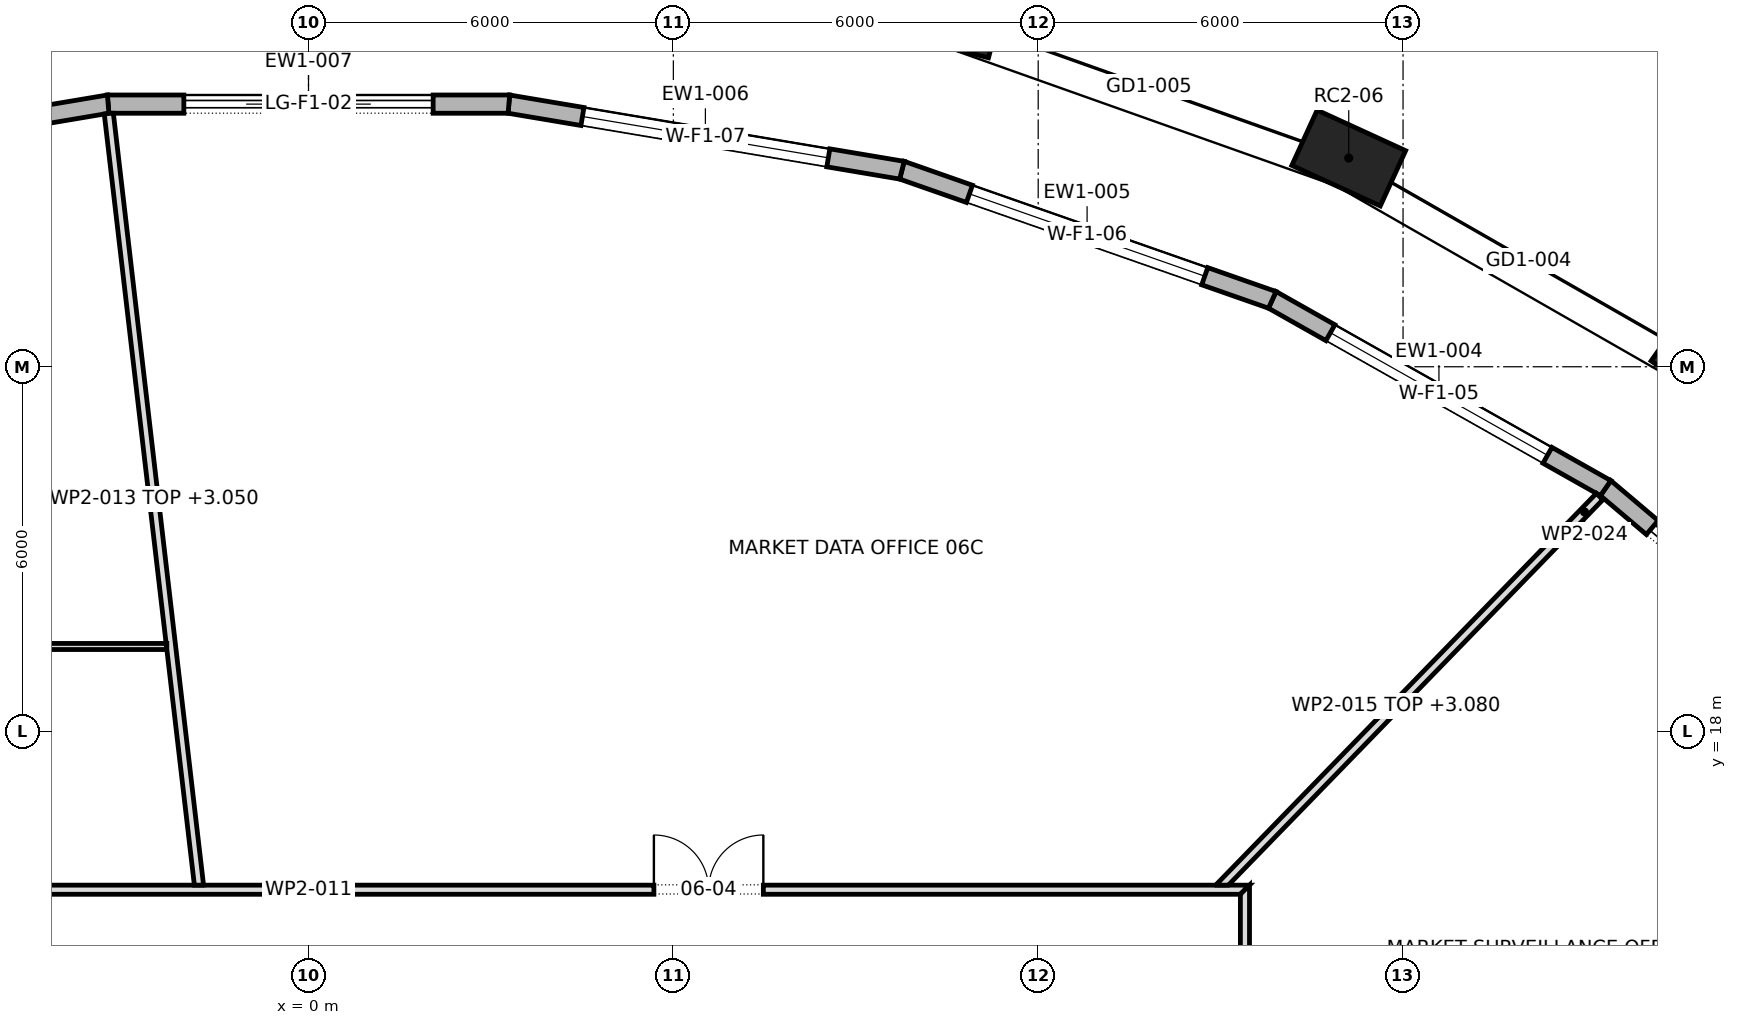
"""IFC4 building model, lengths in metres.
Left out: names, types, materials, properties, quantities, classifications, styles, units other than length and angle.
Written with IfcOpenShell. Run it as: python <this file> out.ifc"""

import sys

from ifc_helpers import new_model, si_unit, direction, frame, frame_2d, origin, origin_2d, place, context, subcontext, project, spatial, polyline, rectangle, outline, extrude, element, fill, save


model = new_model("IFC4")
c1 = context("Model", 3, precision=1e-05, world=origin(), true_north=direction((0.0, 1.0)))
c2 = subcontext(c1, "Body", "Model", "MODEL_VIEW")
j1 = project(units=[si_unit("LENGTHUNIT", "METRE"), si_unit("PLANEANGLEUNIT", "RADIAN")], contexts=[c1])
p1 = place(None, origin())
s1 = spatial("IfcSite", under=j1, at=p1, CompositionType="ELEMENT")
p2 = place(p1, origin())
s2 = spatial("IfcBuilding", under=s1, at=p2, CompositionType="ELEMENT")
p3 = place(p2, frame((0.0, 0.0, 86.5)))
s3 = spatial("IfcBuildingStorey", under=s2, at=p3, CompositionType="ELEMENT", Elevation=86.5)
for number, where, z_axis, x_axis in (
    (1, (23.022, 24.045, 0.0), (0.0, 0.0, 1.0), (-0.818, 0.575, 0.0)),
    (2, (17.107, 27.432, 0.0), (0.0, 0.0, 1.0), (-0.909, 0.417, 0.0)),
    (3, (10.534, 29.766, 0.0), (0.0, 0.0, 1.0), (-0.968, 0.252, 0.0)),
):
    element("IfcColumn", number, at=place(p3, frame(where, z_axis=z_axis, x_axis=x_axis)), inside=s3, PredefinedType="COLUMN", context=c2, shape_type="SweptSolid", body=[
        extrude(rectangle(XDim=1.6, YDim=1.0, at=origin_2d()), origin(), (0.0, 0.0, 1.0), 4.2),
    ])
p4 = place(p3, frame((25.996, 18.062, 0.0), z_axis=(0.0, 0.0, 1.0), x_axis=(-0.763753100684, 0.645508482667, 0.0)))
e4 = element("IfcWall", 4, at=p4, inside=s3, PredefinedType="STANDARD", context=c2, shape_type="SweptSolid", body=[
    extrude(outline(polyline([(-0.015, -0.15), (6.122, -0.15), (6.093, 0.15), (0.015, 0.15), (-0.015, -0.15)])), origin(), (0.0, 0.0, 1.0), 3.9),
])
p5 = place(p4, frame((1.004, 0.0, 0.0)))
e5 = element("IfcOpeningElement", 5, at=p5, cuts=e4, PredefinedType="OPENING", context=c2, shape_type="SweptSolid", body=[
    extrude(rectangle(XDim=4.1, YDim=3.45, at=frame_2d((2.05, 1.725))), frame((0.0, 0.162, 0.0), z_axis=(0.0, -1.0, 0.0), x_axis=(1.0, 0.0, 0.0)), (0.0, 0.0, 1.0), 0.324),
])
p6 = place(p3, frame((21.332, 22.004, 0.0), z_axis=(0.0, 0.0, 1.0), x_axis=(-0.870737550302, 0.491748023376, 0.0)))
e6 = element("IfcWall", 6, at=p6, inside=s3, PredefinedType="STANDARD", context=c2, shape_type="SweptSolid", body=[
    extrude(outline(polyline([(-0.014, -0.15), (6.31, -0.15), (6.283, 0.15), (0.014, 0.15), (-0.014, -0.15)])), origin(), (0.0, 0.0, 1.0), 3.9),
])
p7 = place(p6, frame((1.098, 0.0, 0.6)))
e7 = element("IfcOpeningElement", 7, at=p7, cuts=e6, PredefinedType="OPENING", context=c2, shape_type="SweptSolid", body=[
    extrude(rectangle(XDim=4.1, YDim=2.85, at=frame_2d((2.05, 1.425))), frame((0.0, 0.162, 0.0), z_axis=(0.0, -1.0, 0.0), x_axis=(1.0, 0.0, 0.0)), (0.0, 0.0, 1.0), 0.324),
])
p8 = place(p3, frame((15.849, 25.1, 0.0), z_axis=(0.0, 0.0, 1.0), x_axis=(-0.943820008365, 0.330459970057, 0.0)))
e8 = element("IfcWall", 8, at=p8, inside=s3, PredefinedType="STANDARD", context=c2, shape_type="SweptSolid", body=[
    extrude(outline(polyline([(-0.013, -0.15), (6.465, -0.15), (6.44, 0.15), (0.013, 0.15), (-0.013, -0.15)])), origin(), (0.0, 0.0, 1.0), 3.9),
])
p9 = place(p8, frame((1.176, 0.0, 0.6)))
e9 = element("IfcOpeningElement", 9, at=p9, cuts=e8, PredefinedType="OPENING", context=c2, shape_type="SweptSolid", body=[
    extrude(rectangle(XDim=4.1, YDim=2.85, at=frame_2d((2.05, 1.425))), frame((0.0, 0.162, 0.0), z_axis=(0.0, -1.0, 0.0), x_axis=(1.0, 0.0, 0.0)), (0.0, 0.0, 1.0), 0.324),
])
p10 = place(p3, frame((9.759, 27.232, 0.0), z_axis=(0.0, 0.0, 1.0), x_axis=(-0.986162431544, 0.165781961053, 0.0)))
e10 = element("IfcWall", 10, at=p10, inside=s3, PredefinedType="STANDARD", context=c2, shape_type="SweptSolid", body=[
    extrude(outline(polyline([(-0.013, -0.15), (6.567, -0.15), (6.542, 0.15), (0.013, 0.15), (-0.013, -0.15)])), origin(), (0.0, 0.0, 1.0), 3.9),
])
p11 = place(p10, frame((1.227, 0.0, 0.6)))
e11 = element("IfcOpeningElement", 11, at=p11, cuts=e10, PredefinedType="OPENING", context=c2, shape_type="SweptSolid", body=[
    extrude(rectangle(XDim=4.1, YDim=2.85, at=frame_2d((2.05, 1.425))), frame((0.0, 0.162, 0.0), z_axis=(0.0, -1.0, 0.0), x_axis=(1.0, 0.0, 0.0)), (0.0, 0.0, 1.0), 0.324),
])
p12 = place(p3, frame((3.295, 28.319, 0.0), z_axis=(0.0, 0.0, 1.0), x_axis=(-1.0, 0.0, 0.0)))
e12 = element("IfcWall", 12, at=p12, inside=s3, PredefinedType="STANDARD", context=c2, shape_type="SweptSolid", body=[
    extrude(outline(polyline([(-0.012, -0.15), (6.602, -0.15), (6.577, 0.15), (0.012, 0.15), (-0.012, -0.15)])), origin(), (0.0, 0.0, 1.0), 3.9),
])
p13 = place(p12, frame((1.245, 0.0, 0.0)))
e13 = element("IfcOpeningElement", 13, at=p13, cuts=e12, PredefinedType="OPENING", context=c2, shape_type="SweptSolid", body=[
    extrude(rectangle(XDim=4.1, YDim=3.45, at=frame_2d((2.05, 1.725))), frame((0.0, 0.162, 0.0), z_axis=(0.0, -1.0, 0.0), x_axis=(1.0, 0.0, 0.0)), (0.0, 0.0, 1.0), 0.324),
])
p14 = place(p3, frame((-3.295, 28.319, 0.0), z_axis=(0.0, 0.0, 1.0), x_axis=(-0.986162431544, -0.165781961053, 0.0)))
e14 = element("IfcWall", 14, at=p14, inside=s3, PredefinedType="STANDARD", context=c2, shape_type="SweptSolid", body=[
    extrude(outline(polyline([(-0.012, -0.15), (6.568, -0.15), (6.542, 0.15), (0.012, 0.15), (-0.012, -0.15)])), origin(), (0.0, 0.0, 1.0), 3.9),
])
p15 = place(p14, frame((1.227, 0.0, 0.6)))
e15 = element("IfcOpeningElement", 15, at=p15, cuts=e14, PredefinedType="OPENING", context=c2, shape_type="SweptSolid", body=[
    extrude(rectangle(XDim=4.1, YDim=2.85, at=frame_2d((2.05, 1.425))), frame((0.0, 0.162, 0.0), z_axis=(0.0, -1.0, 0.0), x_axis=(1.0, 0.0, 0.0)), (0.0, 0.0, 1.0), 0.324),
])
p16 = place(p3, frame((-15.475, 15.4, 0.0), z_axis=(0.0, 0.0, 1.0), x_axis=(1.0, 0.0, 0.0)))
e16 = element("IfcWall", 16, at=p16, inside=s3, PredefinedType="PARTITIONING", context=c2, shape_type="SweptSolid", body=[
    extrude(outline(polyline([(0.15, -0.075), (2.066, -0.075), (3.981, -0.075), (5.897, -0.075), (7.812, -0.075), (9.728, -0.075), (11.644, -0.075), (13.56, -0.075), (15.475, -0.075), (17.391, -0.075), (19.306, -0.075), (21.222, -0.075), (23.138, -0.075), (25.053, -0.075), (26.969, -0.075), (28.885, -0.075), (30.8, -0.075), (30.95, 0.075), (29.016, 0.075), (27.081, 0.075), (25.147, 0.075), (23.212, 0.075), (21.278, 0.075), (19.344, 0.075), (17.409, 0.075), (15.475, 0.075), (13.541, 0.075), (11.606, 0.075), (9.672, 0.075), (7.738, 0.075), (5.803, 0.075), (3.869, 0.075), (1.935, 0.075), (0.0, 0.075), (0.15, -0.075)])), origin(), (0.0, 0.0, 1.0), 3.9),
])
p17 = place(p16, frame((21.155, 0.0, 0.0)))
e17 = element("IfcOpeningElement", 17, at=p17, cuts=e16, PredefinedType="OPENING", context=c2, shape_type="SweptSolid", body=[
    extrude(rectangle(XDim=1.8, YDim=2.1, at=frame_2d((0.9, 1.05))), frame((0.0, 0.087, 0.0), z_axis=(0.0, -1.0, 0.0), x_axis=(1.0, 0.0, 0.0)), (0.0, 0.0, 1.0), 0.174),
])
p18 = place(p16, frame((9.21, 0.0, 0.0)))
e18 = element("IfcOpeningElement", 18, at=p18, cuts=e16, PredefinedType="OPENING", context=c2, shape_type="SweptSolid", body=[
    extrude(rectangle(XDim=1.0, YDim=2.1, at=frame_2d((0.5, 1.05))), frame((0.0, 0.087, 0.0), z_axis=(0.0, -1.0, 0.0), x_axis=(1.0, 0.0, 0.0)), (0.0, 0.0, 1.0), 0.174),
])
p19 = place(p16, frame((2.405, 0.0, 0.0)))
e19 = element("IfcOpeningElement", 19, at=p19, cuts=e16, PredefinedType="OPENING", context=c2, shape_type="SweptSolid", body=[
    extrude(rectangle(XDim=1.0, YDim=2.1, at=frame_2d((0.5, 1.05))), frame((0.0, 0.087, 0.0), z_axis=(0.0, -1.0, 0.0), x_axis=(1.0, 0.0, 0.0)), (0.0, 0.0, 1.0), 0.174),
])
p20 = place(p3, frame((-12.212, 19.4, 0.0), z_axis=(0.0, 0.0, 1.0), x_axis=(1.0, 0.0, 0.0)))
e20 = element("IfcWall", 20, at=p20, inside=s3, PredefinedType="PARTITIONING", context=c2, shape_type="SweptSolid", body=[
    extrude(outline(polyline([(9.882, -0.05), (9.882, -0.047), (9.871, 0.05), (7.896, 0.05), (5.922, 0.05), (3.948, 0.05), (1.974, 0.05), (0.0, 0.05), (0.0, 0.049), (0.063, -0.05), (2.027, -0.05), (3.99, -0.05), (5.954, -0.05), (7.918, -0.05), (9.882, -0.05)])), origin(), (0.0, 0.0, 1.0), 3.9),
])
p21 = place(p20, frame((4.497, 0.0, 0.0)))
e21 = element("IfcOpeningElement", 21, at=p21, cuts=e20, PredefinedType="OPENING", context=c2, shape_type="SweptSolid", body=[
    extrude(rectangle(XDim=0.9, YDim=2.1, at=frame_2d((0.45, 1.05))), frame((0.0, 0.062, 0.0), z_axis=(0.0, -1.0, 0.0), x_axis=(1.0, 0.0, 0.0)), (0.0, 0.0, 1.0), 0.124),
])
p22 = place(p3, frame((-3.284, 28.165, 0.0), z_axis=(0.0, 0.0, 1.0), x_axis=(0.116072244208, -0.993240773491, 0.0)))
e22 = element("IfcWall", 22, at=p22, inside=s3, PredefinedType="PARTITIONING", context=c2, shape_type="SweptSolid", body=[
    extrude(outline(polyline([(0.0, -0.075), (1.753, -0.075), (3.506, -0.075), (5.259, -0.075), (7.012, -0.075), (8.765, -0.075), (8.766, -0.064), (8.862, -0.075), (10.814, -0.075), (12.767, -0.075), (12.784, 0.071), (12.784, 0.075), (10.958, 0.075), (9.133, 0.075), (7.307, 0.075), (5.481, 0.075), (3.656, 0.075), (1.83, 0.075), (0.004, 0.075), (0.0, 0.038), (0.0, -0.075)])), origin(), (0.0, 0.0, 1.0), 3.05),
])
p23 = place(p3, frame((14.972, 15.423, 0.0), z_axis=(0.0, 0.0, 1.0), x_axis=(0.696854208529, 0.717212808067, 0.0)))
e23 = element("IfcWall", 23, at=p23, inside=s3, PredefinedType="PARTITIONING", context=c2, shape_type="SweptSolid", body=[
    extrude(outline(polyline([(0.0, 0.075), (0.0, 0.074), (0.145, -0.075), (1.771, -0.075), (3.397, -0.075), (5.023, -0.075), (6.649, -0.075), (8.274, -0.075), (8.274, 0.075), (6.62, 0.075), (4.965, 0.075), (3.31, 0.075), (1.655, 0.075), (0.0, 0.075)])), origin(), (0.0, 0.0, 1.0), 3.08),
])
p24 = place(p3, frame((15.4, -4.54, 0.0), z_axis=(0.0, 0.0, 1.0), x_axis=(0.0, 1.0, 0.0)))
e24 = element("IfcWall", 24, at=p24, inside=s3, PredefinedType="PARTITIONING", context=c2, shape_type="SweptSolid", body=[
    extrude(outline(polyline([(0.0, -0.075), (1.82, -0.075), (3.639, -0.075), (5.458, -0.075), (7.278, -0.075), (9.098, -0.075), (10.917, -0.075), (12.737, -0.075), (14.556, -0.075), (16.376, -0.075), (18.195, -0.075), (20.015, -0.075), (19.865, 0.075), (17.878, 0.075), (15.892, 0.075), (13.906, 0.075), (11.919, 0.075), (9.933, 0.075), (7.946, 0.075), (5.959, 0.075), (3.973, 0.075), (1.987, 0.075), (0.0, 0.075), (0.0, -0.075)])), origin(), (0.0, 0.0, 1.0), 3.9),
])
p25 = place(p24, frame((5.25, 0.0, 0.0)))
e25 = element("IfcOpeningElement", 25, at=p25, cuts=e24, PredefinedType="OPENING", context=c2, shape_type="SweptSolid", body=[
    extrude(rectangle(XDim=1.0, YDim=2.1, at=frame_2d((0.5, 1.05))), frame((0.0, 0.087, 0.0), z_axis=(0.0, -1.0, 0.0), x_axis=(1.0, 0.0, 0.0)), (0.0, 0.0, 1.0), 0.174),
])
p26 = place(p24, frame((15.22, 0.0, 0.0)))
e26 = element("IfcOpeningElement", 26, at=p26, cuts=e24, PredefinedType="OPENING", context=c2, shape_type="SweptSolid", body=[
    extrude(rectangle(XDim=1.0, YDim=2.1, at=frame_2d((0.5, 1.05))), frame((0.0, 0.087, 0.0), z_axis=(0.0, -1.0, 0.0), x_axis=(1.0, 0.0, 0.0)), (0.0, 0.0, 1.0), 0.174),
])
p27 = place(p3, frame((20.739, 21.358, 0.0), z_axis=(0.0, 0.0, 1.0), x_axis=(0.697039010439, 0.717033205595, 0.0)))
e27 = element("IfcWall", 27, at=p27, inside=s3, PredefinedType="PARTITIONING", context=c2, shape_type="SweptSolid", body=[
    extrude(outline(polyline([(0.0, 0.075), (0.0, -0.075), (0.708, -0.075), (0.708, 0.075), (0.0, 0.075)])), origin(), (0.0, 0.0, 1.0), 3.9),
])
p28 = place(p5, origin())
e28 = element("IfcDoor", 28, at=p28, inside=s3, OperationType="DOUBLE_DOOR_SLIDING", PredefinedType="DOOR", context=c2, shape_type="SweptSolid", body=[
    extrude(rectangle(XDim=4.1, YDim=3.45, at=frame_2d((2.05, 1.725))), frame((0.0, 0.025, 0.0), z_axis=(0.0, -1.0, 0.0), x_axis=(1.0, 0.0, 0.0)), (0.0, 0.0, 1.0), 0.05),
])
fill(e5, e28)
p29 = place(p7, origin())
e29 = element("IfcWindow", 29, at=p29, inside=s3, PartitioningType="TRIPLE_PANEL_VERTICAL", PredefinedType="WINDOW", context=c2, shape_type="SweptSolid", body=[
    extrude(rectangle(XDim=4.1, YDim=2.85, at=frame_2d((2.05, 1.425))), frame((0.0, 0.03, 0.0), z_axis=(0.0, -1.0, 0.0), x_axis=(1.0, 0.0, 0.0)), (0.0, 0.0, 1.0), 0.06),
])
fill(e7, e29)
p30 = place(p9, origin())
e30 = element("IfcWindow", 30, at=p30, inside=s3, PartitioningType="TRIPLE_PANEL_VERTICAL", PredefinedType="WINDOW", context=c2, shape_type="SweptSolid", body=[
    extrude(rectangle(XDim=4.1, YDim=2.85, at=frame_2d((2.05, 1.425))), frame((0.0, 0.03, 0.0), z_axis=(0.0, -1.0, 0.0), x_axis=(1.0, 0.0, 0.0)), (0.0, 0.0, 1.0), 0.06),
])
fill(e9, e30)
p31 = place(p11, origin())
e31 = element("IfcWindow", 31, at=p31, inside=s3, PartitioningType="TRIPLE_PANEL_VERTICAL", PredefinedType="WINDOW", context=c2, shape_type="SweptSolid", body=[
    extrude(rectangle(XDim=4.1, YDim=2.85, at=frame_2d((2.05, 1.425))), frame((0.0, 0.03, 0.0), z_axis=(0.0, -1.0, 0.0), x_axis=(1.0, 0.0, 0.0)), (0.0, 0.0, 1.0), 0.06),
])
fill(e11, e31)
p32 = place(p13, origin())
e32 = element("IfcDoor", 32, at=p32, inside=s3, OperationType="DOUBLE_DOOR_SLIDING", PredefinedType="DOOR", context=c2, shape_type="SweptSolid", body=[
    extrude(rectangle(XDim=4.1, YDim=3.45, at=frame_2d((2.05, 1.725))), frame((0.0, 0.025, 0.0), z_axis=(0.0, -1.0, 0.0), x_axis=(1.0, 0.0, 0.0)), (0.0, 0.0, 1.0), 0.05),
])
fill(e13, e32)
p33 = place(p17, origin())
e33 = element("IfcDoor", 33, at=p33, inside=s3, OperationType="DOUBLE_DOOR_SINGLE_SWING", PredefinedType="DOOR", context=c2, shape_type="SweptSolid", body=[
    extrude(rectangle(XDim=1.8, YDim=2.1, at=frame_2d((0.9, 1.05))), frame((0.0, 0.025, 0.0), z_axis=(0.0, -1.0, 0.0), x_axis=(1.0, 0.0, 0.0)), (0.0, 0.0, 1.0), 0.05),
])
fill(e17, e33)
save(model, sys.argv[1])
